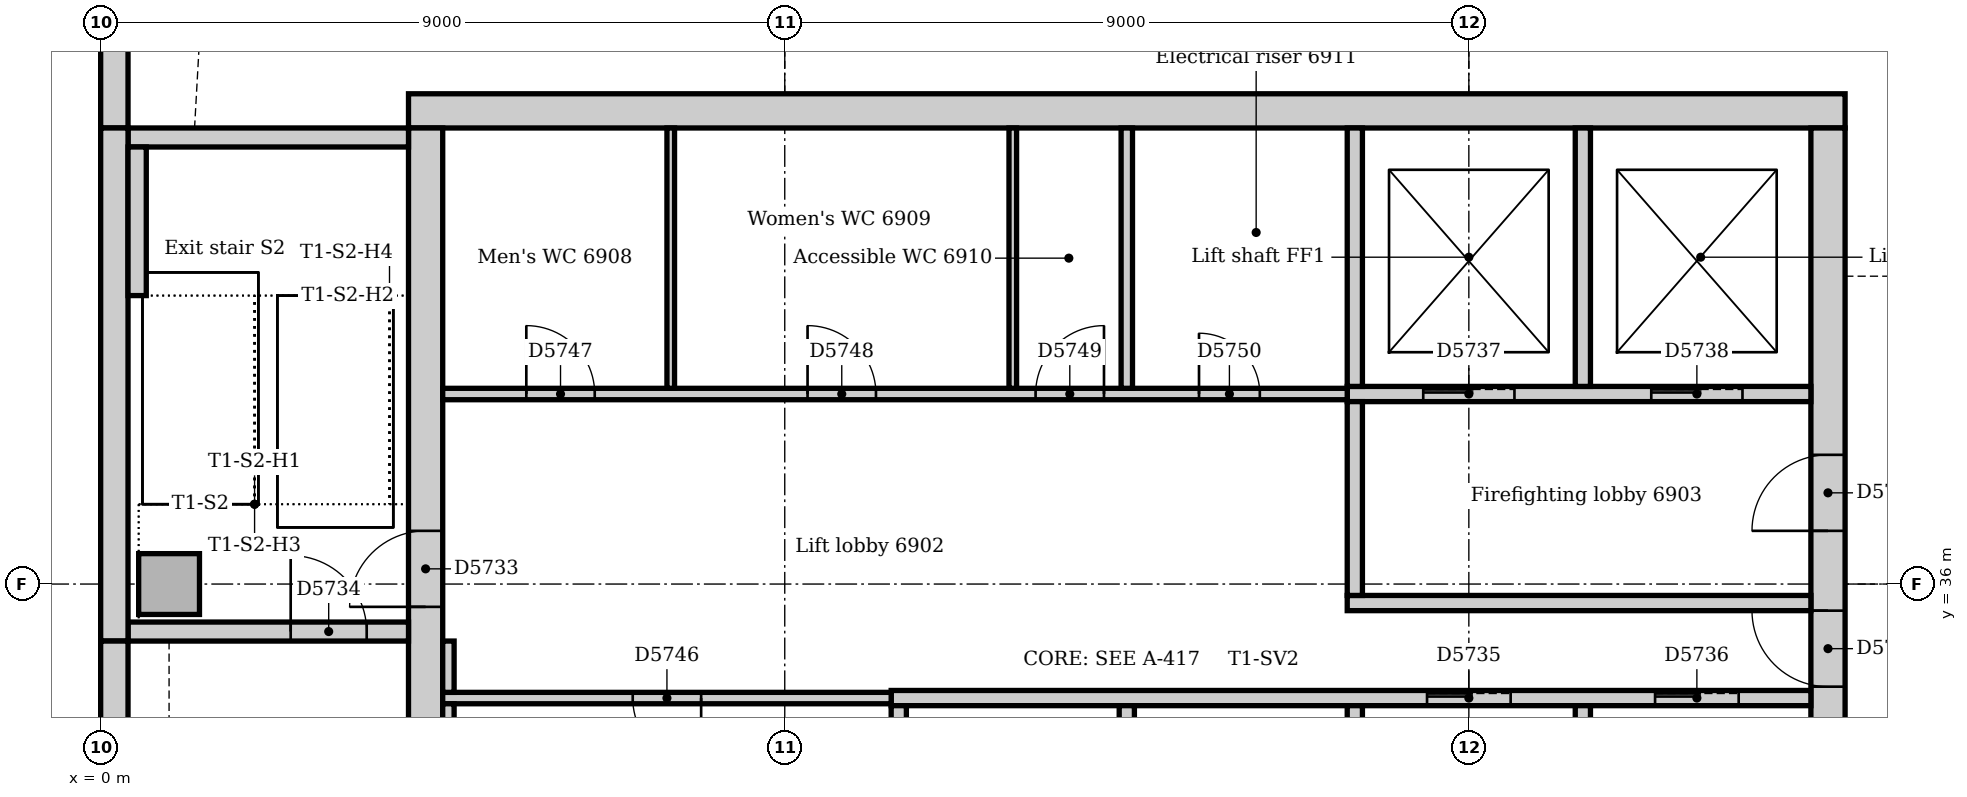
"""IFC4 building model, lengths in metres.
Left out: names, types, materials, properties, quantities, classifications, styles, units other than length and angle.
Written with IfcOpenShell. Run it as: python <this file> out.ifc"""

import sys

from ifc_helpers import new_model, si_unit, direction, frame, frame_2d, origin, origin_2d, place, context, subcontext, project, spatial, rectangle, extrude, element, fill, save


model = new_model("IFC4")
c1 = context("Model", 3, precision=1e-05, world=origin(), true_north=direction((0.0, 1.0)))
c2 = subcontext(c1, "Body", "Model", "MODEL_VIEW")
j1 = project(units=[si_unit("LENGTHUNIT", "METRE"), si_unit("PLANEANGLEUNIT", "RADIAN")], contexts=[c1])
p1 = place(None, origin())
s1 = spatial("IfcSite", under=j1, at=p1, CompositionType="ELEMENT")
p2 = place(p1, origin())
s2 = spatial("IfcBuilding", under=s1, at=p2, CompositionType="ELEMENT")
p3 = place(p2, frame((0.0, 0.0, 291.0)))
s3 = spatial("IfcBuildingStorey", under=s2, at=p3, CompositionType="ELEMENT", Elevation=291.0)
p4 = place(p3, frame((22.95, 42.225, 0.0), z_axis=(0.0, 0.0, 1.0), x_axis=(-1.0, 0.0, 0.0)))
e1 = element("IfcWall", 1, at=p4, inside=s3, PredefinedType="SOLIDWALL", context=c2, shape_type="SweptSolid", body=[
    extrude(rectangle(XDim=18.9, YDim=0.45, at=frame_2d((9.45, 0.0))), origin(), (0.0, 0.0, 1.0), 6.55),
])
p5 = place(p3, frame((22.725, 31.5, 0.0), z_axis=(0.0, 0.0, 1.0), x_axis=(0.0, 1.0, 0.0)))
e2 = element("IfcWall", 2, at=p5, inside=s3, PredefinedType="SOLIDWALL", context=c2, shape_type="SweptSolid", body=[
    extrude(rectangle(XDim=10.5, YDim=0.45, at=frame_2d((5.25, 0.0))), origin(), (0.0, 0.0, 1.0), 6.55),
])
p6 = place(p5, frame((3.15, 0.0, 0.0)))
e3 = element("IfcOpeningElement", 3, at=p6, cuts=e2, PredefinedType="OPENING", context=c2, shape_type="SweptSolid", body=[
    extrude(rectangle(XDim=1.0, YDim=2.1, at=frame_2d((0.5, 1.05))), frame((0.0, 0.235, 0.0), z_axis=(0.0, -1.0, 0.0), x_axis=(1.0, 0.0, 0.0)), (0.0, 0.0, 1.0), 0.47),
])
p7 = place(p5, frame((5.2, 0.0, 0.0)))
e4 = element("IfcOpeningElement", 4, at=p7, cuts=e2, PredefinedType="OPENING", context=c2, shape_type="SweptSolid", body=[
    extrude(rectangle(XDim=1.0, YDim=2.1, at=frame_2d((0.5, 1.05))), frame((0.0, 0.235, 0.0), z_axis=(0.0, -1.0, 0.0), x_axis=(1.0, 0.0, 0.0)), (0.0, 0.0, 1.0), 0.47),
])
p8 = place(p3, frame((4.275, 42.0, 0.0), z_axis=(0.0, 0.0, 1.0), x_axis=(0.0, -1.0, 0.0)))
e5 = element("IfcWall", 5, at=p8, inside=s3, PredefinedType="SOLIDWALL", context=c2, shape_type="SweptSolid", body=[
    extrude(rectangle(XDim=10.5, YDim=0.45, at=frame_2d((5.25, 0.0))), origin(), (0.0, 0.0, 1.0), 6.55),
])
p9 = place(p8, frame((5.3, 0.0, 0.0)))
e6 = element("IfcOpeningElement", 6, at=p9, cuts=e5, PredefinedType="OPENING", context=c2, shape_type="SweptSolid", body=[
    extrude(rectangle(XDim=1.0, YDim=2.1, at=frame_2d((0.5, 1.05))), frame((0.0, 0.235, 0.0), z_axis=(0.0, -1.0, 0.0), x_axis=(1.0, 0.0, 0.0)), (0.0, 0.0, 1.0), 0.47),
])
p10 = place(p3, frame((0.36, 35.375, 0.0), z_axis=(0.0, 0.0, 1.0), x_axis=(1.0, 0.0, 0.0)))
e7 = element("IfcWall", 7, at=p10, inside=s3, PredefinedType="SOLIDWALL", context=c2, shape_type="SweptSolid", body=[
    extrude(rectangle(XDim=3.69, YDim=0.25, at=frame_2d((1.845, 0.0))), origin(), (0.0, 0.0, 1.0), 6.55),
])
p11 = place(p10, frame((2.14, 0.0, 0.0)))
e8 = element("IfcOpeningElement", 8, at=p11, cuts=e7, PredefinedType="OPENING", context=c2, shape_type="SweptSolid", body=[
    extrude(rectangle(XDim=1.0, YDim=2.1, at=frame_2d((0.5, 1.05))), frame((0.0, 0.135, 0.0), z_axis=(0.0, -1.0, 0.0), x_axis=(1.0, 0.0, 0.0)), (0.0, 0.0, 1.0), 0.27),
])
p12 = place(p3, frame((4.05, 41.875, 0.0), z_axis=(0.0, 0.0, 1.0), x_axis=(-1.0, 0.0, 0.0)))
e9 = element("IfcWall", 9, at=p12, inside=s3, PredefinedType="SOLIDWALL", context=c2, shape_type="SweptSolid", body=[
    extrude(rectangle(XDim=3.69, YDim=0.25, at=frame_2d((1.845, 0.0))), origin(), (0.0, 0.0, 1.0), 6.55),
])
p13 = place(p3, frame((0.9, 36.0, 0.0), z_axis=(0.0, 0.0, 1.0), x_axis=(1.0, 0.0, 0.0)))
e10 = element("IfcColumn", 10, at=p13, inside=s3, PredefinedType="COLUMN", context=c2, shape_type="SweptSolid", body=[
    extrude(rectangle(XDim=0.8, YDim=0.8, at=origin_2d()), origin(), (0.0, 0.0, 1.0), 7.0),
])
p14 = place(p3, frame((0.18, 58.757, 0.0), z_axis=(0.0, 0.0, 1.0), x_axis=(0.0, -1.0, 0.0)))
e11 = element("IfcWall", 11, at=p14, inside=s3, PredefinedType="STANDARD", context=c2, shape_type="SweptSolid", body=[
    extrude(rectangle(XDim=16.757, YDim=0.36, at=frame_2d((8.379, 0.0))), origin(), (0.0, 0.0, 1.0), 6.55),
])
p15 = place(p14, frame((3.107, 0.0, 0.9)))
e12 = element("IfcOpeningElement", 12, at=p15, cuts=e11, PredefinedType="OPENING", context=c2, shape_type="SweptSolid", body=[
    extrude(rectangle(XDim=3.3, YDim=2.2, at=frame_2d((1.65, 1.1))), frame((0.0, 0.19, 0.0), z_axis=(0.0, -1.0, 0.0), x_axis=(1.0, 0.0, 0.0)), (0.0, 0.0, 1.0), 0.38),
])
p16 = place(p14, frame((7.607, 0.0, 0.9)))
e13 = element("IfcOpeningElement", 13, at=p16, cuts=e11, PredefinedType="OPENING", context=c2, shape_type="SweptSolid", body=[
    extrude(rectangle(XDim=3.3, YDim=2.2, at=frame_2d((1.65, 1.1))), frame((0.0, 0.19, 0.0), z_axis=(0.0, -1.0, 0.0), x_axis=(1.0, 0.0, 0.0)), (0.0, 0.0, 1.0), 0.38),
])
p17 = place(p14, frame((12.107, 0.0, 0.9)))
e14 = element("IfcOpeningElement", 14, at=p17, cuts=e11, PredefinedType="OPENING", context=c2, shape_type="SweptSolid", body=[
    extrude(rectangle(XDim=3.3, YDim=2.2, at=frame_2d((1.65, 1.1))), frame((0.0, 0.19, 0.0), z_axis=(0.0, -1.0, 0.0), x_axis=(1.0, 0.0, 0.0)), (0.0, 0.0, 1.0), 0.38),
])
p18 = place(p3, frame((0.18, 42.0, 0.0), z_axis=(0.0, 0.0, 1.0), x_axis=(0.0, -1.0, 0.0)))
e15 = element("IfcWall", 15, at=p18, inside=s3, PredefinedType="STANDARD", context=c2, shape_type="SweptSolid", body=[
    extrude(rectangle(XDim=6.75, YDim=0.36, at=frame_2d((3.375, 0.0))), origin(), (0.0, 0.0, 1.0), 6.55),
])
p19 = place(p3, frame((0.18, 35.25, 0.0), z_axis=(0.0, 0.0, 1.0), x_axis=(0.0, -1.0, 0.0)))
e16 = element("IfcWall", 16, at=p19, inside=s3, PredefinedType="STANDARD", context=c2, shape_type="SweptSolid", body=[
    extrude(rectangle(XDim=7.5, YDim=0.36, at=frame_2d((3.75, 0.0))), origin(), (0.0, 0.0, 1.0), 6.55),
])
p20 = place(p3, frame((0.48, 39.795, 0.0), z_axis=(0.0, 0.0, 1.0), x_axis=(0.0, 1.0, 0.0)))
e17 = element("IfcWall", 17, at=p20, inside=s3, PredefinedType="STANDARD", context=c2, shape_type="SweptSolid", body=[
    extrude(rectangle(XDim=1.955, YDim=0.24, at=frame_2d((0.978, 0.0))), origin(), (0.0, 0.0, 1.0), 7.0),
])
p21 = place(p3, frame((16.4, 35.75, 0.0), z_axis=(0.0, 0.0, 1.0), x_axis=(1.0, 0.0, 0.0)))
e18 = element("IfcWall", 18, at=p21, inside=s3, PredefinedType="PARTITIONING", context=c2, shape_type="SweptSolid", body=[
    extrude(rectangle(XDim=6.1, YDim=0.2, at=frame_2d((3.05, 0.0))), origin(), (0.0, 0.0, 1.0), 6.55),
])
p22 = place(p3, frame((16.4, 38.5, 0.0), z_axis=(0.0, 0.0, 1.0), x_axis=(1.0, 0.0, 0.0)))
e19 = element("IfcWall", 19, at=p22, inside=s3, PredefinedType="PARTITIONING", context=c2, shape_type="SweptSolid", body=[
    extrude(rectangle(XDim=6.1, YDim=0.2, at=frame_2d((3.05, 0.0))), origin(), (0.0, 0.0, 1.0), 6.55),
])
p23 = place(p22, frame((1.0, 0.0, 0.0)))
e20 = element("IfcOpeningElement", 20, at=p23, cuts=e19, PredefinedType="OPENING", context=c2, shape_type="SweptSolid", body=[
    extrude(rectangle(XDim=1.2, YDim=2.1, at=frame_2d((0.6, 1.05))), frame((0.0, 0.11, 0.0), z_axis=(0.0, -1.0, 0.0), x_axis=(1.0, 0.0, 0.0)), (0.0, 0.0, 1.0), 0.22),
])
p24 = place(p22, frame((4.0, 0.0, 0.0)))
e21 = element("IfcOpeningElement", 21, at=p24, cuts=e19, PredefinedType="OPENING", context=c2, shape_type="SweptSolid", body=[
    extrude(rectangle(XDim=1.2, YDim=2.1, at=frame_2d((0.6, 1.05))), frame((0.0, 0.11, 0.0), z_axis=(0.0, -1.0, 0.0), x_axis=(1.0, 0.0, 0.0)), (0.0, 0.0, 1.0), 0.22),
])
p25 = place(p3, frame((16.5, 35.85, 0.0), z_axis=(0.0, 0.0, 1.0), x_axis=(0.0, 1.0, 0.0)))
e22 = element("IfcWall", 22, at=p25, inside=s3, PredefinedType="PARTITIONING", context=c2, shape_type="SweptSolid", body=[
    extrude(rectangle(XDim=2.55, YDim=0.2, at=frame_2d((1.275, 0.0))), origin(), (0.0, 0.0, 1.0), 6.55),
])
p26 = place(p3, frame((10.4, 34.5, 0.0), z_axis=(0.0, 0.0, 1.0), x_axis=(1.0, 0.0, 0.0)))
e23 = element("IfcWall", 23, at=p26, inside=s3, PredefinedType="PARTITIONING", context=c2, shape_type="SweptSolid", body=[
    extrude(rectangle(XDim=12.1, YDim=0.2, at=frame_2d((6.05, 0.0))), origin(), (0.0, 0.0, 1.0), 6.55),
])
p27 = place(p26, frame((7.05, 0.0, 0.0)))
e24 = element("IfcOpeningElement", 24, at=p27, cuts=e23, PredefinedType="OPENING", context=c2, shape_type="SweptSolid", body=[
    extrude(rectangle(XDim=1.1, YDim=2.1, at=frame_2d((0.55, 1.05))), frame((0.0, 0.11, 0.0), z_axis=(0.0, -1.0, 0.0), x_axis=(1.0, 0.0, 0.0)), (0.0, 0.0, 1.0), 0.22),
])
p28 = place(p26, frame((10.05, 0.0, 0.0)))
e25 = element("IfcOpeningElement", 25, at=p28, cuts=e23, PredefinedType="OPENING", context=c2, shape_type="SweptSolid", body=[
    extrude(rectangle(XDim=1.1, YDim=2.1, at=frame_2d((0.55, 1.05))), frame((0.0, 0.11, 0.0), z_axis=(0.0, -1.0, 0.0), x_axis=(1.0, 0.0, 0.0)), (0.0, 0.0, 1.0), 0.22),
])
for number, where, z_axis, x_axis in (
    (26, (10.5, 31.75, 0.0), (0.0, 0.0, 1.0), (0.0, 1.0, 0.0)),
    (27, (13.5, 31.75, 0.0), (0.0, 0.0, 1.0), (0.0, 1.0, 0.0)),
    (28, (16.5, 31.75, 0.0), (0.0, 0.0, 1.0), (0.0, 1.0, 0.0)),
    (29, (19.5, 31.75, 0.0), (0.0, 0.0, 1.0), (0.0, 1.0, 0.0)),
):
    element("IfcWall", number, at=place(p3, frame(where, z_axis=z_axis, x_axis=x_axis)), inside=s3, PredefinedType="PARTITIONING", context=c2, shape_type="SweptSolid", body=[
        extrude(rectangle(XDim=2.65, YDim=0.2, at=frame_2d((1.325, 0.0))), origin(), (0.0, 0.0, 1.0), 6.55),
    ])
for number, where, z_axis, x_axis in (
    (30, (16.5, 38.6, 0.0), (0.0, 0.0, 1.0), (0.0, 1.0, 0.0)),
    (31, (19.5, 38.6, 0.0), (0.0, 0.0, 1.0), (0.0, 1.0, 0.0)),
):
    element("IfcWall", number, at=place(p3, frame(where, z_axis=z_axis, x_axis=x_axis)), inside=s3, PredefinedType="PARTITIONING", context=c2, shape_type="SweptSolid", body=[
        extrude(rectangle(XDim=3.4, YDim=0.2, at=frame_2d((1.7, 0.0))), origin(), (0.0, 0.0, 1.0), 6.55),
    ])
p29 = place(p3, frame((4.5, 38.5, 0.0), z_axis=(0.0, 0.0, 1.0), x_axis=(1.0, 0.0, 0.0)))
e32 = element("IfcWall", 32, at=p29, inside=s3, PredefinedType="PARTITIONING", context=c2, shape_type="SweptSolid", body=[
    extrude(rectangle(XDim=11.9, YDim=0.15, at=frame_2d((5.95, 0.0))), origin(), (0.0, 0.0, 1.0), 6.55),
])
p30 = place(p29, frame((1.1, 0.0, 0.0)))
e33 = element("IfcOpeningElement", 33, at=p30, cuts=e32, PredefinedType="OPENING", context=c2, shape_type="SweptSolid", body=[
    extrude(rectangle(XDim=0.9, YDim=2.1, at=frame_2d((0.45, 1.05))), frame((0.0, 0.085, 0.0), z_axis=(0.0, -1.0, 0.0), x_axis=(1.0, 0.0, 0.0)), (0.0, 0.0, 1.0), 0.17),
])
p31 = place(p29, frame((4.8, 0.0, 0.0)))
e34 = element("IfcOpeningElement", 34, at=p31, cuts=e32, PredefinedType="OPENING", context=c2, shape_type="SweptSolid", body=[
    extrude(rectangle(XDim=0.9, YDim=2.1, at=frame_2d((0.45, 1.05))), frame((0.0, 0.085, 0.0), z_axis=(0.0, -1.0, 0.0), x_axis=(1.0, 0.0, 0.0)), (0.0, 0.0, 1.0), 0.17),
])
p32 = place(p29, frame((7.8, 0.0, 0.0)))
e35 = element("IfcOpeningElement", 35, at=p32, cuts=e32, PredefinedType="OPENING", context=c2, shape_type="SweptSolid", body=[
    extrude(rectangle(XDim=0.9, YDim=2.1, at=frame_2d((0.45, 1.05))), frame((0.0, 0.085, 0.0), z_axis=(0.0, -1.0, 0.0), x_axis=(1.0, 0.0, 0.0)), (0.0, 0.0, 1.0), 0.17),
])
p33 = place(p29, frame((9.95, 0.0, 0.0)))
e36 = element("IfcOpeningElement", 36, at=p33, cuts=e32, PredefinedType="OPENING", context=c2, shape_type="SweptSolid", body=[
    extrude(rectangle(XDim=0.8, YDim=2.1, at=frame_2d((0.4, 1.05))), frame((0.0, 0.085, 0.0), z_axis=(0.0, -1.0, 0.0), x_axis=(1.0, 0.0, 0.0)), (0.0, 0.0, 1.0), 0.17),
])
p34 = place(p3, frame((4.5, 34.5, 0.0), z_axis=(0.0, 0.0, 1.0), x_axis=(1.0, 0.0, 0.0)))
e37 = element("IfcWall", 37, at=p34, inside=s3, PredefinedType="PARTITIONING", context=c2, shape_type="SweptSolid", body=[
    extrude(rectangle(XDim=5.9, YDim=0.15, at=frame_2d((2.95, 0.0))), origin(), (0.0, 0.0, 1.0), 6.55),
])
p35 = place(p34, frame((2.5, 0.0, 0.0)))
e38 = element("IfcOpeningElement", 38, at=p35, cuts=e37, PredefinedType="OPENING", context=c2, shape_type="SweptSolid", body=[
    extrude(rectangle(XDim=0.9, YDim=2.1, at=frame_2d((0.45, 1.05))), frame((0.0, 0.085, 0.0), z_axis=(0.0, -1.0, 0.0), x_axis=(1.0, 0.0, 0.0)), (0.0, 0.0, 1.0), 0.17),
])
p36 = place(p3, frame((4.575, 34.575, 0.0), z_axis=(0.0, 0.0, 1.0), x_axis=(0.0, 1.0, 0.0)))
e39 = element("IfcWall", 39, at=p36, inside=s3, PredefinedType="PARTITIONING", context=c2, shape_type="SweptSolid", body=[
    extrude(rectangle(XDim=0.675, YDim=0.15, at=frame_2d((0.338, 0.0))), origin(), (0.0, 0.0, 1.0), 6.55),
])
p37 = place(p3, frame((4.575, 31.75, 0.0), z_axis=(0.0, 0.0, 1.0), x_axis=(0.0, 1.0, 0.0)))
e40 = element("IfcWall", 40, at=p37, inside=s3, PredefinedType="PARTITIONING", context=c2, shape_type="SweptSolid", body=[
    extrude(rectangle(XDim=2.675, YDim=0.15, at=frame_2d((1.337, 0.0))), origin(), (0.0, 0.0, 1.0), 6.55),
])
p38 = place(p3, frame((13.5, 38.575, 0.0), z_axis=(0.0, 0.0, 1.0), x_axis=(0.0, 1.0, 0.0)))
e41 = element("IfcWall", 41, at=p38, inside=s3, PredefinedType="PARTITIONING", context=c2, shape_type="SweptSolid", body=[
    extrude(rectangle(XDim=3.425, YDim=0.15, at=frame_2d((1.712, 0.0))), origin(), (0.0, 0.0, 1.0), 6.55),
])
for number, where, z_axis, x_axis in (
    (42, (7.5, 38.575, 0.0), (0.0, 0.0, 1.0), (0.0, 1.0, 0.0)),
    (43, (12.0, 38.575, 0.0), (0.0, 0.0, 1.0), (0.0, 1.0, 0.0)),
):
    element("IfcWall", number, at=place(p3, frame(where, z_axis=z_axis, x_axis=x_axis)), inside=s3, PredefinedType="PARTITIONING", context=c2, shape_type="SweptSolid", body=[
        extrude(rectangle(XDim=3.425, YDim=0.1, at=frame_2d((1.712, 0.0))), origin(), (0.0, 0.0, 1.0), 6.55),
    ])
p39 = place(p9, frame((1.0, 0.0, 0.0), z_axis=(0.0, 0.0, 1.0), x_axis=(-1.0, 0.0, 0.0)))
e44 = element("IfcDoor", 44, at=p39, inside=s3, OperationType="SINGLE_SWING_LEFT", PredefinedType="DOOR", context=c2, shape_type="SweptSolid", body=[
    extrude(rectangle(XDim=1.0, YDim=2.1, at=frame_2d((0.5, 1.05))), frame((0.0, 0.025, 0.0), z_axis=(0.0, -1.0, 0.0), x_axis=(1.0, 0.0, 0.0)), (0.0, 0.0, 1.0), 0.05),
])
fill(e6, e44)
p40 = place(p11, origin())
e45 = element("IfcDoor", 45, at=p40, inside=s3, OperationType="SINGLE_SWING_LEFT", PredefinedType="DOOR", context=c2, shape_type="SweptSolid", body=[
    extrude(rectangle(XDim=1.0, YDim=2.1, at=frame_2d((0.5, 1.05))), frame((0.0, 0.025, 0.0), z_axis=(0.0, -1.0, 0.0), x_axis=(1.0, 0.0, 0.0)), (0.0, 0.0, 1.0), 0.05),
])
fill(e8, e45)
p41 = place(p27, origin())
e46 = element("IfcDoor", 46, at=p41, inside=s3, OperationType="SLIDING_TO_LEFT", PredefinedType="DOOR", context=c2, shape_type="SweptSolid", body=[
    extrude(rectangle(XDim=1.1, YDim=2.1, at=frame_2d((0.55, 1.05))), frame((0.0, 0.025, 0.0), z_axis=(0.0, -1.0, 0.0), x_axis=(1.0, 0.0, 0.0)), (0.0, 0.0, 1.0), 0.05),
])
fill(e24, e46)
p42 = place(p28, origin())
e47 = element("IfcDoor", 47, at=p42, inside=s3, OperationType="SLIDING_TO_LEFT", PredefinedType="DOOR", context=c2, shape_type="SweptSolid", body=[
    extrude(rectangle(XDim=1.1, YDim=2.1, at=frame_2d((0.55, 1.05))), frame((0.0, 0.025, 0.0), z_axis=(0.0, -1.0, 0.0), x_axis=(1.0, 0.0, 0.0)), (0.0, 0.0, 1.0), 0.05),
])
fill(e25, e47)
p43 = place(p23, origin())
e48 = element("IfcDoor", 48, at=p43, inside=s3, OperationType="SLIDING_TO_LEFT", PredefinedType="DOOR", context=c2, shape_type="SweptSolid", body=[
    extrude(rectangle(XDim=1.2, YDim=2.1, at=frame_2d((0.6, 1.05))), frame((0.0, 0.025, 0.0), z_axis=(0.0, -1.0, 0.0), x_axis=(1.0, 0.0, 0.0)), (0.0, 0.0, 1.0), 0.05),
])
fill(e20, e48)
p44 = place(p24, origin())
e49 = element("IfcDoor", 49, at=p44, inside=s3, OperationType="SLIDING_TO_LEFT", PredefinedType="DOOR", context=c2, shape_type="SweptSolid", body=[
    extrude(rectangle(XDim=1.2, YDim=2.1, at=frame_2d((0.6, 1.05))), frame((0.0, 0.025, 0.0), z_axis=(0.0, -1.0, 0.0), x_axis=(1.0, 0.0, 0.0)), (0.0, 0.0, 1.0), 0.05),
])
fill(e21, e49)
p45 = place(p6, origin())
e50 = element("IfcDoor", 50, at=p45, inside=s3, OperationType="SINGLE_SWING_RIGHT", PredefinedType="DOOR", context=c2, shape_type="SweptSolid", body=[
    extrude(rectangle(XDim=1.0, YDim=2.1, at=frame_2d((0.5, 1.05))), frame((0.0, 0.025, 0.0), z_axis=(0.0, -1.0, 0.0), x_axis=(1.0, 0.0, 0.0)), (0.0, 0.0, 1.0), 0.05),
])
fill(e3, e50)
p46 = place(p7, origin())
e51 = element("IfcDoor", 51, at=p46, inside=s3, OperationType="SINGLE_SWING_LEFT", PredefinedType="DOOR", context=c2, shape_type="SweptSolid", body=[
    extrude(rectangle(XDim=1.0, YDim=2.1, at=frame_2d((0.5, 1.05))), frame((0.0, 0.025, 0.0), z_axis=(0.0, -1.0, 0.0), x_axis=(1.0, 0.0, 0.0)), (0.0, 0.0, 1.0), 0.05),
])
fill(e4, e51)
p47 = place(p35, frame((0.9, 0.0, 0.0), z_axis=(0.0, 0.0, 1.0), x_axis=(-1.0, 0.0, 0.0)))
e52 = element("IfcDoor", 52, at=p47, inside=s3, OperationType="SINGLE_SWING_LEFT", PredefinedType="DOOR", context=c2, shape_type="SweptSolid", body=[
    extrude(rectangle(XDim=0.9, YDim=2.1, at=frame_2d((0.45, 1.05))), frame((0.0, 0.025, 0.0), z_axis=(0.0, -1.0, 0.0), x_axis=(1.0, 0.0, 0.0)), (0.0, 0.0, 1.0), 0.05),
])
fill(e38, e52)
p48 = place(p30, origin())
e53 = element("IfcDoor", 53, at=p48, inside=s3, OperationType="SINGLE_SWING_LEFT", PredefinedType="DOOR", context=c2, shape_type="SweptSolid", body=[
    extrude(rectangle(XDim=0.9, YDim=2.1, at=frame_2d((0.45, 1.05))), frame((0.0, 0.025, 0.0), z_axis=(0.0, -1.0, 0.0), x_axis=(1.0, 0.0, 0.0)), (0.0, 0.0, 1.0), 0.05),
])
fill(e33, e53)
p49 = place(p31, origin())
e54 = element("IfcDoor", 54, at=p49, inside=s3, OperationType="SINGLE_SWING_LEFT", PredefinedType="DOOR", context=c2, shape_type="SweptSolid", body=[
    extrude(rectangle(XDim=0.9, YDim=2.1, at=frame_2d((0.45, 1.05))), frame((0.0, 0.025, 0.0), z_axis=(0.0, -1.0, 0.0), x_axis=(1.0, 0.0, 0.0)), (0.0, 0.0, 1.0), 0.05),
])
fill(e34, e54)
p50 = place(p32, origin())
e55 = element("IfcDoor", 55, at=p50, inside=s3, OperationType="SINGLE_SWING_RIGHT", PredefinedType="DOOR", context=c2, shape_type="SweptSolid", body=[
    extrude(rectangle(XDim=0.9, YDim=2.1, at=frame_2d((0.45, 1.05))), frame((0.0, 0.025, 0.0), z_axis=(0.0, -1.0, 0.0), x_axis=(1.0, 0.0, 0.0)), (0.0, 0.0, 1.0), 0.05),
])
fill(e35, e55)
p51 = place(p33, origin())
e56 = element("IfcDoor", 56, at=p51, inside=s3, OperationType="SINGLE_SWING_LEFT", PredefinedType="DOOR", context=c2, shape_type="SweptSolid", body=[
    extrude(rectangle(XDim=0.8, YDim=2.1, at=frame_2d((0.4, 1.05))), frame((0.0, 0.025, 0.0), z_axis=(0.0, -1.0, 0.0), x_axis=(1.0, 0.0, 0.0)), (0.0, 0.0, 1.0), 0.05),
])
fill(e36, e56)
save(model, sys.argv[1])
